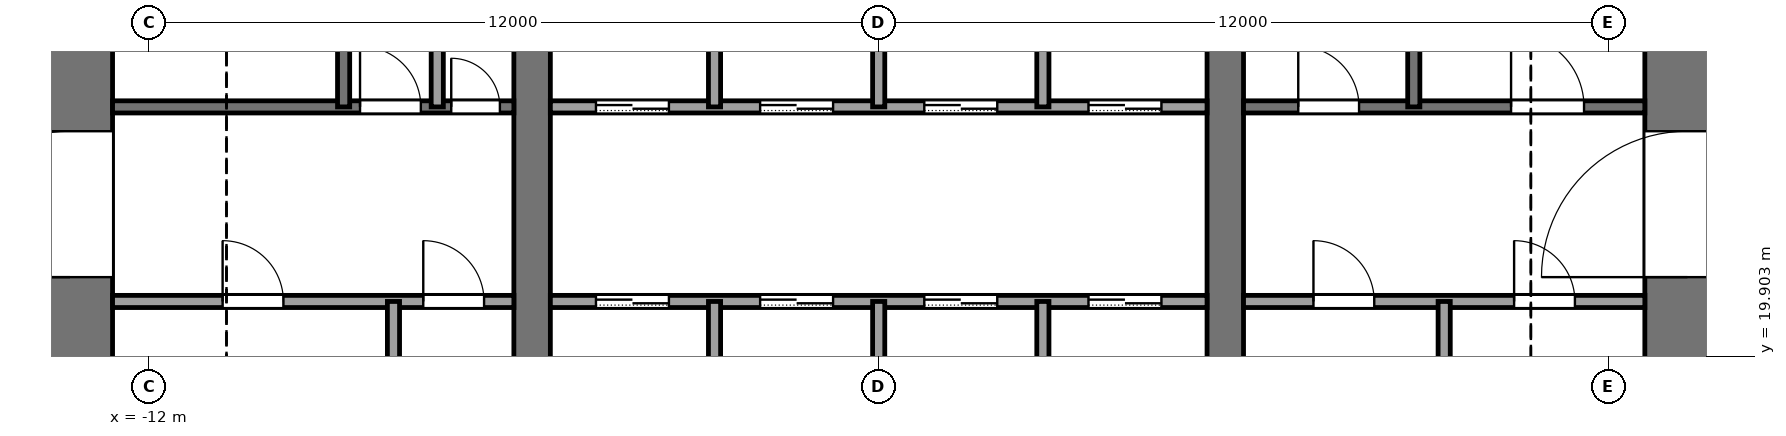
"""IFC4 building model, lengths in metres.
Left out: names, types, materials, properties, quantities, classifications, styles, units other than length and angle.
Written with IfcOpenShell. Run it as: python <this file> out.ifc"""

import sys

from ifc_helpers import new_model, si_unit, direction, frame, frame_2d, origin, place, context, subcontext, project, spatial, rectangle, extrude, element, fill, save


model = new_model("IFC4")
c1 = context("Model", 3, precision=1e-05, world=origin(), true_north=direction((0.0, 1.0)))
c2 = subcontext(c1, "Body", "Model", "MODEL_VIEW")
j1 = project(units=[si_unit("LENGTHUNIT", "METRE"), si_unit("PLANEANGLEUNIT", "RADIAN")], contexts=[c1])
p1 = place(None, origin())
s1 = spatial("IfcSite", under=j1, at=p1, CompositionType="ELEMENT")
p2 = place(p1, origin())
s2 = spatial("IfcBuilding", under=s1, at=p2, CompositionType="ELEMENT")
p3 = place(p2, frame((0.0, 0.0, 34.0)))
s3 = spatial("IfcBuildingStorey", under=s2, at=p3, CompositionType="ELEMENT", Elevation=34.0)
p4 = place(p3, frame((-13.3, 18.4, -0.13), z_axis=(0.0, 0.0, 1.0), x_axis=(0.0, 1.0, 0.0)))
e1 = element("IfcWall", 1, at=p4, inside=s3, PredefinedType="SHEAR", context=c2, shape_type="SweptSolid", body=[
    extrude(rectangle(XDim=19.2, YDim=1.4, at=frame_2d((9.6, 0.0))), origin(), (0.0, 0.0, 1.0), 4.0),
])
p5 = place(p4, frame((2.8, 0.0, 0.13)))
e2 = element("IfcOpeningElement", 2, at=p5, cuts=e1, PredefinedType="OPENING", context=c2, shape_type="SweptSolid", body=[
    extrude(rectangle(XDim=2.4, YDim=2.4, at=frame_2d((1.2, 1.2))), frame((0.0, 0.71, 0.0), z_axis=(0.0, -1.0, 0.0), x_axis=(1.0, 0.0, 0.0)), (0.0, 0.0, 1.0), 1.42),
])
p6 = place(p4, frame((13.4, 0.0, 0.13)))
e3 = element("IfcOpeningElement", 3, at=p6, cuts=e1, PredefinedType="OPENING", context=c2, shape_type="SweptSolid", body=[
    extrude(rectangle(XDim=1.4, YDim=2.2, at=frame_2d((0.7, 1.1))), frame((0.0, 0.71, 0.0), z_axis=(0.0, -1.0, 0.0), x_axis=(1.0, 0.0, 0.0)), (0.0, 0.0, 1.0), 1.42),
])
p7 = place(p3, frame((13.3, 18.4, -0.13), z_axis=(0.0, 0.0, 1.0), x_axis=(0.0, 1.0, 0.0)))
e4 = element("IfcWall", 4, at=p7, inside=s3, PredefinedType="SHEAR", context=c2, shape_type="SweptSolid", body=[
    extrude(rectangle(XDim=19.2, YDim=1.4, at=frame_2d((9.6, 0.0))), origin(), (0.0, 0.0, 1.0), 4.0),
])
p8 = place(p7, frame((2.8, 0.0, 0.13)))
e5 = element("IfcOpeningElement", 5, at=p8, cuts=e4, PredefinedType="OPENING", context=c2, shape_type="SweptSolid", body=[
    extrude(rectangle(XDim=2.4, YDim=2.4, at=frame_2d((1.2, 1.2))), frame((0.0, 0.71, 0.0), z_axis=(0.0, -1.0, 0.0), x_axis=(1.0, 0.0, 0.0)), (0.0, 0.0, 1.0), 1.42),
])
p9 = place(p7, frame((13.3, 0.0, 0.13)))
e6 = element("IfcOpeningElement", 6, at=p9, cuts=e4, PredefinedType="OPENING", context=c2, shape_type="SweptSolid", body=[
    extrude(rectangle(XDim=2.4, YDim=2.4, at=frame_2d((1.2, 1.2))), frame((0.0, 0.71, 0.0), z_axis=(0.0, -1.0, 0.0), x_axis=(1.0, 0.0, 0.0)), (0.0, 0.0, 1.0), 1.42),
])
p10 = place(p3, frame((-5.7, 18.4, -0.13), z_axis=(0.0, 0.0, 1.0), x_axis=(0.0, 1.0, 0.0)))
e7 = element("IfcWall", 7, at=p10, inside=s3, PredefinedType="SHEAR", context=c2, shape_type="SweptSolid", body=[
    extrude(rectangle(XDim=19.2, YDim=0.6, at=frame_2d((9.6, 0.0))), origin(), (0.0, 0.0, 1.0), 4.0),
])
p11 = place(p10, frame((8.35, 0.0, 0.13)))
e8 = element("IfcOpeningElement", 8, at=p11, cuts=e7, PredefinedType="OPENING", context=c2, shape_type="SweptSolid", body=[
    extrude(rectangle(XDim=0.9, YDim=2.1, at=frame_2d((0.45, 1.05))), frame((0.0, 0.31, 0.0), z_axis=(0.0, -1.0, 0.0), x_axis=(1.0, 0.0, 0.0)), (0.0, 0.0, 1.0), 0.62),
])
p12 = place(p3, frame((5.7, 18.4, -0.13), z_axis=(0.0, 0.0, 1.0), x_axis=(0.0, 1.0, 0.0)))
e9 = element("IfcWall", 9, at=p12, inside=s3, PredefinedType="SHEAR", context=c2, shape_type="SweptSolid", body=[
    extrude(rectangle(XDim=19.2, YDim=0.6, at=frame_2d((9.6, 0.0))), origin(), (0.0, 0.0, 1.0), 4.0),
])
p13 = place(p12, frame((8.35, 0.0, 0.13)))
e10 = element("IfcOpeningElement", 10, at=p13, cuts=e9, PredefinedType="OPENING", context=c2, shape_type="SweptSolid", body=[
    extrude(rectangle(XDim=0.9, YDim=2.1, at=frame_2d((0.45, 1.05))), frame((0.0, 0.31, 0.0), z_axis=(0.0, -1.0, 0.0), x_axis=(1.0, 0.0, 0.0)), (0.0, 0.0, 1.0), 0.62),
])
p14 = place(p12, frame((13.3, 0.0, 0.13)))
e11 = element("IfcOpeningElement", 11, at=p14, cuts=e9, PredefinedType="OPENING", context=c2, shape_type="SweptSolid", body=[
    extrude(rectangle(XDim=2.4, YDim=2.4, at=frame_2d((1.2, 1.2))), frame((0.0, 0.31, 0.0), z_axis=(0.0, -1.0, 0.0), x_axis=(1.0, 0.0, 0.0)), (0.0, 0.0, 1.0), 0.62),
])
p15 = place(p3, frame((-12.6, 20.8, 0.0), z_axis=(0.0, 0.0, 1.0), x_axis=(1.0, 0.0, 0.0)))
e12 = element("IfcWall", 12, at=p15, inside=s3, PredefinedType="PARTITIONING", context=c2, shape_type="SweptSolid", body=[
    extrude(rectangle(XDim=6.6, YDim=0.2, at=frame_2d((3.3, 0.0))), origin(), (0.0, 0.0, 1.0), 3.87),
])
p16 = place(p15, frame((1.81, 0.0, 0.0)))
e13 = element("IfcOpeningElement", 13, at=p16, cuts=e12, PredefinedType="OPENING", context=c2, shape_type="SweptSolid", body=[
    extrude(rectangle(XDim=1.0, YDim=2.1, at=frame_2d((0.5, 1.05))), frame((0.0, 0.11, 0.0), z_axis=(0.0, -1.0, 0.0), x_axis=(1.0, 0.0, 0.0)), (0.0, 0.0, 1.0), 0.22),
])
p17 = place(p15, frame((5.11, 0.0, 0.0)))
e14 = element("IfcOpeningElement", 14, at=p17, cuts=e12, PredefinedType="OPENING", context=c2, shape_type="SweptSolid", body=[
    extrude(rectangle(XDim=1.0, YDim=2.1, at=frame_2d((0.5, 1.05))), frame((0.0, 0.11, 0.0), z_axis=(0.0, -1.0, 0.0), x_axis=(1.0, 0.0, 0.0)), (0.0, 0.0, 1.0), 0.22),
])
p18 = place(p3, frame((-5.4, 20.8, 0.0), z_axis=(0.0, 0.0, 1.0), x_axis=(1.0, 0.0, 0.0)))
e15 = element("IfcWall", 15, at=p18, inside=s3, PredefinedType="PARTITIONING", context=c2, shape_type="SweptSolid", body=[
    extrude(rectangle(XDim=10.8, YDim=0.2, at=frame_2d((5.4, 0.0))), origin(), (0.0, 0.0, 1.0), 3.87),
])
p19 = place(p18, frame((0.75, 0.0, 0.0)))
e16 = element("IfcOpeningElement", 16, at=p19, cuts=e15, PredefinedType="OPENING", context=c2, shape_type="SweptSolid", body=[
    extrude(rectangle(XDim=1.2, YDim=2.2, at=frame_2d((0.6, 1.1))), frame((0.0, 0.11, 0.0), z_axis=(0.0, -1.0, 0.0), x_axis=(1.0, 0.0, 0.0)), (0.0, 0.0, 1.0), 0.22),
])
p20 = place(p18, frame((3.45, 0.0, 0.0)))
e17 = element("IfcOpeningElement", 17, at=p20, cuts=e15, PredefinedType="OPENING", context=c2, shape_type="SweptSolid", body=[
    extrude(rectangle(XDim=1.2, YDim=2.2, at=frame_2d((0.6, 1.1))), frame((0.0, 0.11, 0.0), z_axis=(0.0, -1.0, 0.0), x_axis=(1.0, 0.0, 0.0)), (0.0, 0.0, 1.0), 0.22),
])
p21 = place(p18, frame((6.15, 0.0, 0.0)))
e18 = element("IfcOpeningElement", 18, at=p21, cuts=e15, PredefinedType="OPENING", context=c2, shape_type="SweptSolid", body=[
    extrude(rectangle(XDim=1.2, YDim=2.2, at=frame_2d((0.6, 1.1))), frame((0.0, 0.11, 0.0), z_axis=(0.0, -1.0, 0.0), x_axis=(1.0, 0.0, 0.0)), (0.0, 0.0, 1.0), 0.22),
])
p22 = place(p18, frame((8.85, 0.0, 0.0)))
e19 = element("IfcOpeningElement", 19, at=p22, cuts=e15, PredefinedType="OPENING", context=c2, shape_type="SweptSolid", body=[
    extrude(rectangle(XDim=1.2, YDim=2.2, at=frame_2d((0.6, 1.1))), frame((0.0, 0.11, 0.0), z_axis=(0.0, -1.0, 0.0), x_axis=(1.0, 0.0, 0.0)), (0.0, 0.0, 1.0), 0.22),
])
p23 = place(p3, frame((6.0, 20.8, 0.0), z_axis=(0.0, 0.0, 1.0), x_axis=(1.0, 0.0, 0.0)))
e20 = element("IfcWall", 20, at=p23, inside=s3, PredefinedType="PARTITIONING", context=c2, shape_type="SweptSolid", body=[
    extrude(rectangle(XDim=6.6, YDim=0.2, at=frame_2d((3.3, 0.0))), origin(), (0.0, 0.0, 1.0), 3.87),
])
p24 = place(p23, frame((1.15, 0.0, 0.0)))
e21 = element("IfcOpeningElement", 21, at=p24, cuts=e20, PredefinedType="OPENING", context=c2, shape_type="SweptSolid", body=[
    extrude(rectangle(XDim=1.0, YDim=2.1, at=frame_2d((0.5, 1.05))), frame((0.0, 0.11, 0.0), z_axis=(0.0, -1.0, 0.0), x_axis=(1.0, 0.0, 0.0)), (0.0, 0.0, 1.0), 0.22),
])
p25 = place(p23, frame((4.45, 0.0, 0.0)))
e22 = element("IfcOpeningElement", 22, at=p25, cuts=e20, PredefinedType="OPENING", context=c2, shape_type="SweptSolid", body=[
    extrude(rectangle(XDim=1.0, YDim=2.1, at=frame_2d((0.5, 1.05))), frame((0.0, 0.11, 0.0), z_axis=(0.0, -1.0, 0.0), x_axis=(1.0, 0.0, 0.0)), (0.0, 0.0, 1.0), 0.22),
])
p26 = place(p3, frame((-12.6, 24.0, 0.0), z_axis=(0.0, 0.0, 1.0), x_axis=(1.0, 0.0, 0.0)))
e23 = element("IfcWall", 23, at=p26, inside=s3, PredefinedType="PARTITIONING", context=c2, shape_type="SweptSolid", body=[
    extrude(rectangle(XDim=6.6, YDim=0.2, at=frame_2d((3.3, 0.0))), origin(), (0.0, 0.0, 1.0), 3.87),
])
p27 = place(p26, frame((4.07, 0.0, 0.0)))
e24 = element("IfcOpeningElement", 24, at=p27, cuts=e23, PredefinedType="OPENING", context=c2, shape_type="SweptSolid", body=[
    extrude(rectangle(XDim=1.0, YDim=2.1, at=frame_2d((0.5, 1.05))), frame((0.0, 0.11, 0.0), z_axis=(0.0, -1.0, 0.0), x_axis=(1.0, 0.0, 0.0)), (0.0, 0.0, 1.0), 0.22),
])
p28 = place(p26, frame((5.57, 0.0, 0.0)))
e25 = element("IfcOpeningElement", 25, at=p28, cuts=e23, PredefinedType="OPENING", context=c2, shape_type="SweptSolid", body=[
    extrude(rectangle(XDim=0.8, YDim=2.1, at=frame_2d((0.4, 1.05))), frame((0.0, 0.11, 0.0), z_axis=(0.0, -1.0, 0.0), x_axis=(1.0, 0.0, 0.0)), (0.0, 0.0, 1.0), 0.22),
])
p29 = place(p3, frame((-5.4, 24.0, 0.0), z_axis=(0.0, 0.0, 1.0), x_axis=(1.0, 0.0, 0.0)))
e26 = element("IfcWall", 26, at=p29, inside=s3, PredefinedType="PARTITIONING", context=c2, shape_type="SweptSolid", body=[
    extrude(rectangle(XDim=10.8, YDim=0.2, at=frame_2d((5.4, 0.0))), origin(), (0.0, 0.0, 1.0), 3.87),
])
p30 = place(p29, frame((0.75, 0.0, 0.0)))
e27 = element("IfcOpeningElement", 27, at=p30, cuts=e26, PredefinedType="OPENING", context=c2, shape_type="SweptSolid", body=[
    extrude(rectangle(XDim=1.2, YDim=2.2, at=frame_2d((0.6, 1.1))), frame((0.0, 0.11, 0.0), z_axis=(0.0, -1.0, 0.0), x_axis=(1.0, 0.0, 0.0)), (0.0, 0.0, 1.0), 0.22),
])
p31 = place(p29, frame((3.45, 0.0, 0.0)))
e28 = element("IfcOpeningElement", 28, at=p31, cuts=e26, PredefinedType="OPENING", context=c2, shape_type="SweptSolid", body=[
    extrude(rectangle(XDim=1.2, YDim=2.2, at=frame_2d((0.6, 1.1))), frame((0.0, 0.11, 0.0), z_axis=(0.0, -1.0, 0.0), x_axis=(1.0, 0.0, 0.0)), (0.0, 0.0, 1.0), 0.22),
])
p32 = place(p29, frame((6.15, 0.0, 0.0)))
e29 = element("IfcOpeningElement", 29, at=p32, cuts=e26, PredefinedType="OPENING", context=c2, shape_type="SweptSolid", body=[
    extrude(rectangle(XDim=1.2, YDim=2.2, at=frame_2d((0.6, 1.1))), frame((0.0, 0.11, 0.0), z_axis=(0.0, -1.0, 0.0), x_axis=(1.0, 0.0, 0.0)), (0.0, 0.0, 1.0), 0.22),
])
p33 = place(p29, frame((8.85, 0.0, 0.0)))
e30 = element("IfcOpeningElement", 30, at=p33, cuts=e26, PredefinedType="OPENING", context=c2, shape_type="SweptSolid", body=[
    extrude(rectangle(XDim=1.2, YDim=2.2, at=frame_2d((0.6, 1.1))), frame((0.0, 0.11, 0.0), z_axis=(0.0, -1.0, 0.0), x_axis=(1.0, 0.0, 0.0)), (0.0, 0.0, 1.0), 0.22),
])
p34 = place(p3, frame((6.0, 24.0, 0.0), z_axis=(0.0, 0.0, 1.0), x_axis=(1.0, 0.0, 0.0)))
e31 = element("IfcWall", 31, at=p34, inside=s3, PredefinedType="PARTITIONING", context=c2, shape_type="SweptSolid", body=[
    extrude(rectangle(XDim=6.6, YDim=0.2, at=frame_2d((3.3, 0.0))), origin(), (0.0, 0.0, 1.0), 3.87),
])
p35 = place(p34, frame((0.9, 0.0, 0.0)))
e32 = element("IfcOpeningElement", 32, at=p35, cuts=e31, PredefinedType="OPENING", context=c2, shape_type="SweptSolid", body=[
    extrude(rectangle(XDim=1.0, YDim=2.1, at=frame_2d((0.5, 1.05))), frame((0.0, 0.11, 0.0), z_axis=(0.0, -1.0, 0.0), x_axis=(1.0, 0.0, 0.0)), (0.0, 0.0, 1.0), 0.22),
])
p36 = place(p34, frame((4.4, 0.0, 0.0)))
e33 = element("IfcOpeningElement", 33, at=p36, cuts=e31, PredefinedType="OPENING", context=c2, shape_type="SweptSolid", body=[
    extrude(rectangle(XDim=1.2, YDim=2.2, at=frame_2d((0.6, 1.1))), frame((0.0, 0.11, 0.0), z_axis=(0.0, -1.0, 0.0), x_axis=(1.0, 0.0, 0.0)), (0.0, 0.0, 1.0), 0.22),
])
p37 = place(p3, frame((-8.8, 24.0, 0.0), z_axis=(0.0, 0.0, 1.0), x_axis=(0.0, 1.0, 0.0)))
e34 = element("IfcWall", 34, at=p37, inside=s3, PredefinedType="PARTITIONING", context=c2, shape_type="SweptSolid", body=[
    extrude(rectangle(XDim=7.4, YDim=0.2, at=frame_2d((3.7, 0.0))), origin(), (0.0, 0.0, 1.0), 3.87),
])
p38 = place(p3, frame((-7.98, 18.4, 0.0), z_axis=(0.0, 0.0, 1.0), x_axis=(0.0, 1.0, 0.0)))
e35 = element("IfcWall", 35, at=p38, inside=s3, PredefinedType="PARTITIONING", context=c2, shape_type="SweptSolid", body=[
    extrude(rectangle(XDim=2.4, YDim=0.2, at=frame_2d((1.2, 0.0))), origin(), (0.0, 0.0, 1.0), 3.87),
])
p39 = place(p3, frame((-7.26, 24.0, 0.0), z_axis=(0.0, 0.0, 1.0), x_axis=(0.0, 1.0, 0.0)))
e36 = element("IfcWall", 36, at=p39, inside=s3, PredefinedType="PARTITIONING", context=c2, shape_type="SweptSolid", body=[
    extrude(rectangle(XDim=7.4, YDim=0.2, at=frame_2d((3.7, 0.0))), origin(), (0.0, 0.0, 1.0), 3.87),
])
p40 = place(p3, frame((-2.7, 18.4, 0.0), z_axis=(0.0, 0.0, 1.0), x_axis=(0.0, 1.0, 0.0)))
e37 = element("IfcWall", 37, at=p40, inside=s3, PredefinedType="PARTITIONING", context=c2, shape_type="SweptSolid", body=[
    extrude(rectangle(XDim=2.4, YDim=0.2, at=frame_2d((1.2, 0.0))), origin(), (0.0, 0.0, 1.0), 3.87),
])
p41 = place(p3, frame((-2.7, 24.0, 0.0), z_axis=(0.0, 0.0, 1.0), x_axis=(0.0, 1.0, 0.0)))
e38 = element("IfcWall", 38, at=p41, inside=s3, PredefinedType="PARTITIONING", context=c2, shape_type="SweptSolid", body=[
    extrude(rectangle(XDim=2.4, YDim=0.2, at=frame_2d((1.2, 0.0))), origin(), (0.0, 0.0, 1.0), 3.87),
])
p42 = place(p3, frame((0.0, 18.4, 0.0), z_axis=(0.0, 0.0, 1.0), x_axis=(0.0, 1.0, 0.0)))
e39 = element("IfcWall", 39, at=p42, inside=s3, PredefinedType="PARTITIONING", context=c2, shape_type="SweptSolid", body=[
    extrude(rectangle(XDim=2.4, YDim=0.2, at=frame_2d((1.2, 0.0))), origin(), (0.0, 0.0, 1.0), 3.87),
])
p43 = place(p3, frame((0.0, 24.0, 0.0), z_axis=(0.0, 0.0, 1.0), x_axis=(0.0, 1.0, 0.0)))
e40 = element("IfcWall", 40, at=p43, inside=s3, PredefinedType="PARTITIONING", context=c2, shape_type="SweptSolid", body=[
    extrude(rectangle(XDim=6.4, YDim=0.2, at=frame_2d((3.2, 0.0))), origin(), (0.0, 0.0, 1.0), 3.87),
])
p44 = place(p3, frame((2.7, 18.4, 0.0), z_axis=(0.0, 0.0, 1.0), x_axis=(0.0, 1.0, 0.0)))
e41 = element("IfcWall", 41, at=p44, inside=s3, PredefinedType="PARTITIONING", context=c2, shape_type="SweptSolid", body=[
    extrude(rectangle(XDim=2.4, YDim=0.2, at=frame_2d((1.2, 0.0))), origin(), (0.0, 0.0, 1.0), 3.87),
])
p45 = place(p3, frame((2.7, 24.0, 0.0), z_axis=(0.0, 0.0, 1.0), x_axis=(0.0, 1.0, 0.0)))
e42 = element("IfcWall", 42, at=p45, inside=s3, PredefinedType="PARTITIONING", context=c2, shape_type="SweptSolid", body=[
    extrude(rectangle(XDim=2.4, YDim=0.2, at=frame_2d((1.2, 0.0))), origin(), (0.0, 0.0, 1.0), 3.87),
])
p46 = place(p3, frame((8.8, 24.0, 0.0), z_axis=(0.0, 0.0, 1.0), x_axis=(0.0, 1.0, 0.0)))
e43 = element("IfcWall", 43, at=p46, inside=s3, PredefinedType="PARTITIONING", context=c2, shape_type="SweptSolid", body=[
    extrude(rectangle(XDim=7.4, YDim=0.2, at=frame_2d((3.7, 0.0))), origin(), (0.0, 0.0, 1.0), 3.87),
])
p47 = place(p3, frame((9.3, 18.4, 0.0), z_axis=(0.0, 0.0, 1.0), x_axis=(0.0, 1.0, 0.0)))
e44 = element("IfcWall", 44, at=p47, inside=s3, PredefinedType="PARTITIONING", context=c2, shape_type="SweptSolid", body=[
    extrude(rectangle(XDim=2.4, YDim=0.2, at=frame_2d((1.2, 0.0))), origin(), (0.0, 0.0, 1.0), 3.87),
])
p48 = place(p19, origin())
e45 = element("IfcDoor", 45, at=p48, inside=s3, OperationType="SLIDING_TO_LEFT", PredefinedType="DOOR", context=c2, shape_type="SweptSolid", body=[
    extrude(rectangle(XDim=1.2, YDim=2.2, at=frame_2d((0.6, 1.1))), frame((0.0, 0.025, 0.0), z_axis=(0.0, -1.0, 0.0), x_axis=(1.0, 0.0, 0.0)), (0.0, 0.0, 1.0), 0.05),
])
fill(e16, e45)
p49 = place(p20, origin())
e46 = element("IfcDoor", 46, at=p49, inside=s3, OperationType="SLIDING_TO_LEFT", PredefinedType="DOOR", context=c2, shape_type="SweptSolid", body=[
    extrude(rectangle(XDim=1.2, YDim=2.2, at=frame_2d((0.6, 1.1))), frame((0.0, 0.025, 0.0), z_axis=(0.0, -1.0, 0.0), x_axis=(1.0, 0.0, 0.0)), (0.0, 0.0, 1.0), 0.05),
])
fill(e17, e46)
p50 = place(p21, origin())
e47 = element("IfcDoor", 47, at=p50, inside=s3, OperationType="SLIDING_TO_LEFT", PredefinedType="DOOR", context=c2, shape_type="SweptSolid", body=[
    extrude(rectangle(XDim=1.2, YDim=2.2, at=frame_2d((0.6, 1.1))), frame((0.0, 0.025, 0.0), z_axis=(0.0, -1.0, 0.0), x_axis=(1.0, 0.0, 0.0)), (0.0, 0.0, 1.0), 0.05),
])
fill(e18, e47)
p51 = place(p22, origin())
e48 = element("IfcDoor", 48, at=p51, inside=s3, OperationType="SLIDING_TO_LEFT", PredefinedType="DOOR", context=c2, shape_type="SweptSolid", body=[
    extrude(rectangle(XDim=1.2, YDim=2.2, at=frame_2d((0.6, 1.1))), frame((0.0, 0.025, 0.0), z_axis=(0.0, -1.0, 0.0), x_axis=(1.0, 0.0, 0.0)), (0.0, 0.0, 1.0), 0.05),
])
fill(e19, e48)
p52 = place(p30, origin())
e49 = element("IfcDoor", 49, at=p52, inside=s3, OperationType="SLIDING_TO_LEFT", PredefinedType="DOOR", context=c2, shape_type="SweptSolid", body=[
    extrude(rectangle(XDim=1.2, YDim=2.2, at=frame_2d((0.6, 1.1))), frame((0.0, 0.025, 0.0), z_axis=(0.0, -1.0, 0.0), x_axis=(1.0, 0.0, 0.0)), (0.0, 0.0, 1.0), 0.05),
])
fill(e27, e49)
p53 = place(p31, origin())
e50 = element("IfcDoor", 50, at=p53, inside=s3, OperationType="SLIDING_TO_LEFT", PredefinedType="DOOR", context=c2, shape_type="SweptSolid", body=[
    extrude(rectangle(XDim=1.2, YDim=2.2, at=frame_2d((0.6, 1.1))), frame((0.0, 0.025, 0.0), z_axis=(0.0, -1.0, 0.0), x_axis=(1.0, 0.0, 0.0)), (0.0, 0.0, 1.0), 0.05),
])
fill(e28, e50)
p54 = place(p32, origin())
e51 = element("IfcDoor", 51, at=p54, inside=s3, OperationType="SLIDING_TO_LEFT", PredefinedType="DOOR", context=c2, shape_type="SweptSolid", body=[
    extrude(rectangle(XDim=1.2, YDim=2.2, at=frame_2d((0.6, 1.1))), frame((0.0, 0.025, 0.0), z_axis=(0.0, -1.0, 0.0), x_axis=(1.0, 0.0, 0.0)), (0.0, 0.0, 1.0), 0.05),
])
fill(e29, e51)
p55 = place(p33, origin())
e52 = element("IfcDoor", 52, at=p55, inside=s3, OperationType="SLIDING_TO_LEFT", PredefinedType="DOOR", context=c2, shape_type="SweptSolid", body=[
    extrude(rectangle(XDim=1.2, YDim=2.2, at=frame_2d((0.6, 1.1))), frame((0.0, 0.025, 0.0), z_axis=(0.0, -1.0, 0.0), x_axis=(1.0, 0.0, 0.0)), (0.0, 0.0, 1.0), 0.05),
])
fill(e30, e52)
p56 = place(p16, origin())
e53 = element("IfcDoor", 53, at=p56, inside=s3, OperationType="SINGLE_SWING_LEFT", PredefinedType="DOOR", context=c2, shape_type="SweptSolid", body=[
    extrude(rectangle(XDim=1.0, YDim=2.1, at=frame_2d((0.5, 1.05))), frame((0.0, 0.025, 0.0), z_axis=(0.0, -1.0, 0.0), x_axis=(1.0, 0.0, 0.0)), (0.0, 0.0, 1.0), 0.05),
])
fill(e13, e53)
p57 = place(p17, origin())
e54 = element("IfcDoor", 54, at=p57, inside=s3, OperationType="SINGLE_SWING_LEFT", PredefinedType="DOOR", context=c2, shape_type="SweptSolid", body=[
    extrude(rectangle(XDim=1.0, YDim=2.1, at=frame_2d((0.5, 1.05))), frame((0.0, 0.025, 0.0), z_axis=(0.0, -1.0, 0.0), x_axis=(1.0, 0.0, 0.0)), (0.0, 0.0, 1.0), 0.05),
])
fill(e14, e54)
p58 = place(p24, origin())
e55 = element("IfcDoor", 55, at=p58, inside=s3, OperationType="SINGLE_SWING_LEFT", PredefinedType="DOOR", context=c2, shape_type="SweptSolid", body=[
    extrude(rectangle(XDim=1.0, YDim=2.1, at=frame_2d((0.5, 1.05))), frame((0.0, 0.025, 0.0), z_axis=(0.0, -1.0, 0.0), x_axis=(1.0, 0.0, 0.0)), (0.0, 0.0, 1.0), 0.05),
])
fill(e21, e55)
p59 = place(p25, origin())
e56 = element("IfcDoor", 56, at=p59, inside=s3, OperationType="SINGLE_SWING_LEFT", PredefinedType="DOOR", context=c2, shape_type="SweptSolid", body=[
    extrude(rectangle(XDim=1.0, YDim=2.1, at=frame_2d((0.5, 1.05))), frame((0.0, 0.025, 0.0), z_axis=(0.0, -1.0, 0.0), x_axis=(1.0, 0.0, 0.0)), (0.0, 0.0, 1.0), 0.05),
])
fill(e22, e56)
p60 = place(p27, origin())
e57 = element("IfcDoor", 57, at=p60, inside=s3, OperationType="SINGLE_SWING_RIGHT", PredefinedType="DOOR", context=c2, shape_type="SweptSolid", body=[
    extrude(rectangle(XDim=1.0, YDim=2.1, at=frame_2d((0.5, 1.05))), frame((0.0, 0.025, 0.0), z_axis=(0.0, -1.0, 0.0), x_axis=(1.0, 0.0, 0.0)), (0.0, 0.0, 1.0), 0.05),
])
fill(e24, e57)
p61 = place(p28, origin())
e58 = element("IfcDoor", 58, at=p61, inside=s3, OperationType="SINGLE_SWING_LEFT", PredefinedType="DOOR", context=c2, shape_type="SweptSolid", body=[
    extrude(rectangle(XDim=0.8, YDim=2.1, at=frame_2d((0.4, 1.05))), frame((0.0, 0.025, 0.0), z_axis=(0.0, -1.0, 0.0), x_axis=(1.0, 0.0, 0.0)), (0.0, 0.0, 1.0), 0.05),
])
fill(e25, e58)
p62 = place(p35, origin())
e59 = element("IfcDoor", 59, at=p62, inside=s3, OperationType="SINGLE_SWING_RIGHT", PredefinedType="DOOR", context=c2, shape_type="SweptSolid", body=[
    extrude(rectangle(XDim=1.0, YDim=2.1, at=frame_2d((0.5, 1.05))), frame((0.0, 0.025, 0.0), z_axis=(0.0, -1.0, 0.0), x_axis=(1.0, 0.0, 0.0)), (0.0, 0.0, 1.0), 0.05),
])
fill(e32, e59)
p63 = place(p36, origin())
e60 = element("IfcDoor", 60, at=p63, inside=s3, OperationType="SINGLE_SWING_LEFT", PredefinedType="DOOR", context=c2, shape_type="SweptSolid", body=[
    extrude(rectangle(XDim=1.2, YDim=2.2, at=frame_2d((0.6, 1.1))), frame((0.0, 0.025, 0.0), z_axis=(0.0, -1.0, 0.0), x_axis=(1.0, 0.0, 0.0)), (0.0, 0.0, 1.0), 0.05),
])
fill(e33, e60)
p64 = place(p5, origin())
e61 = element("IfcDoor", 61, at=p64, inside=s3, OperationType="DOUBLE_DOOR_SINGLE_SWING", PredefinedType="DOOR", context=c2, shape_type="SweptSolid", body=[
    extrude(rectangle(XDim=2.4, YDim=2.4, at=frame_2d((1.2, 1.2))), frame((0.0, 0.025, 0.0), z_axis=(0.0, -1.0, 0.0), x_axis=(1.0, 0.0, 0.0)), (0.0, 0.0, 1.0), 0.05),
])
fill(e2, e61)
p65 = place(p8, origin())
e62 = element("IfcDoor", 62, at=p65, inside=s3, OperationType="DOUBLE_DOOR_SINGLE_SWING", PredefinedType="DOOR", context=c2, shape_type="SweptSolid", body=[
    extrude(rectangle(XDim=2.4, YDim=2.4, at=frame_2d((1.2, 1.2))), frame((0.0, 0.025, 0.0), z_axis=(0.0, -1.0, 0.0), x_axis=(1.0, 0.0, 0.0)), (0.0, 0.0, 1.0), 0.05),
])
fill(e5, e62)
save(model, sys.argv[1])
